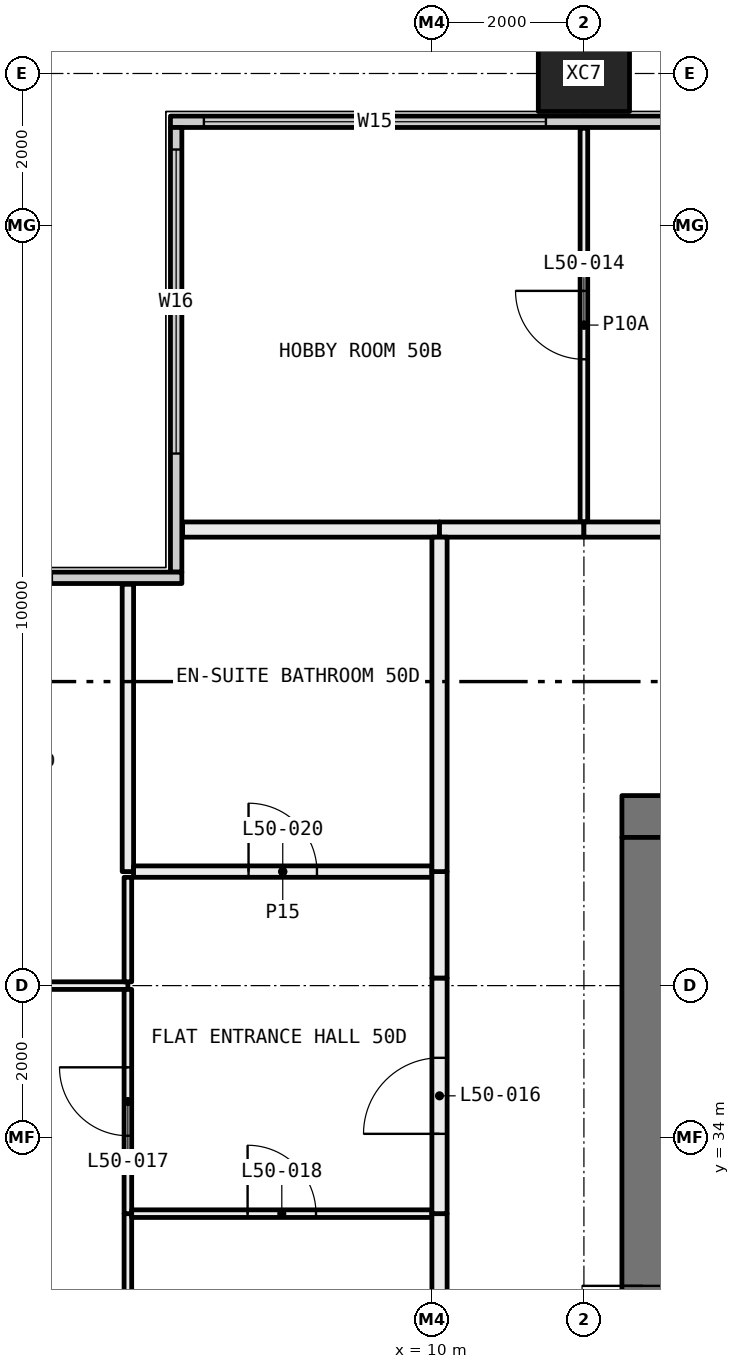
"""IFC4 building model, lengths in metres.
Left out: names, types, materials, properties, quantities, classifications, styles, units other than length and angle.
Written with IfcOpenShell. Run it as: python <this file> out.ifc"""

import sys

from ifc_helpers import new_model, si_unit, direction, frame, frame_2d, origin, origin_2d, place, context, subcontext, project, spatial, rectangle, hollow_rectangle, extrude, element, fill, save


model = new_model("IFC4")
c1 = context("Model", 3, precision=1e-05, world=origin(), true_north=direction((0.0, 1.0)))
c2 = subcontext(c1, "Body", "Model", "MODEL_VIEW")
j1 = project(units=[si_unit("LENGTHUNIT", "METRE"), si_unit("PLANEANGLEUNIT", "RADIAN")], contexts=[c1])
p1 = place(None, origin())
s1 = spatial("IfcSite", under=j1, at=p1, CompositionType="ELEMENT")
p2 = place(p1, origin())
s2 = spatial("IfcBuilding", under=s1, at=p2, CompositionType="ELEMENT")
p3 = place(p2, frame((0.0, 0.0, 189.3)))
s3 = spatial("IfcBuildingStorey", under=s2, at=p3, CompositionType="ELEMENT", Elevation=189.3)
p4 = place(p3, frame((12.0, 48.0, -0.4), z_axis=(0.0, 0.0, 1.0), x_axis=(1.0, 0.0, 0.0)))
e1 = element("IfcColumn", 1, at=p4, inside=s3, PredefinedType="COLUMN", context=c2, shape_type="SweptSolid", body=[
    extrude(hollow_rectangle(XDim=1.2, YDim=1.0, WallThickness=0.045, at=origin_2d()), origin(), (0.0, 0.0, 1.0), 3.45),
])
p5 = place(p3, frame((6.56, 47.365, 0.0), z_axis=(0.0, 0.0, 1.0), x_axis=(1.0, 0.0, 0.0)))
e2 = element("IfcWall", 2, at=p5, inside=s3, PredefinedType="ELEMENTEDWALL", context=c2, shape_type="SweptSolid", body=[
    extrude(rectangle(XDim=46.88, YDim=0.15, at=frame_2d((23.44, 0.0))), origin(), (0.0, 0.0, 1.0), 3.05),
])
p6 = place(p5, frame((0.44, 0.0, 0.45)))
e3 = element("IfcOpeningElement", 3, at=p6, cuts=e2, PredefinedType="OPENING", context=c2, shape_type="SweptSolid", body=[
    extrude(rectangle(XDim=4.5, YDim=2.55, at=frame_2d((2.25, 1.275))), frame((0.0, 0.085, 0.0), z_axis=(0.0, -1.0, 0.0), x_axis=(1.0, 0.0, 0.0)), (0.0, 0.0, 1.0), 0.17),
])
p7 = place(p5, frame((7.69, 0.0, 0.45)))
e4 = element("IfcOpeningElement", 4, at=p7, cuts=e2, PredefinedType="OPENING", context=c2, shape_type="SweptSolid", body=[
    extrude(rectangle(XDim=3.25, YDim=2.55, at=frame_2d((1.625, 1.275))), frame((0.0, 0.085, 0.0), z_axis=(0.0, -1.0, 0.0), x_axis=(1.0, 0.0, 0.0)), (0.0, 0.0, 1.0), 0.17),
])
p8 = place(p5, frame((11.94, 0.0, 0.45)))
e5 = element("IfcOpeningElement", 5, at=p8, cuts=e2, PredefinedType="OPENING", context=c2, shape_type="SweptSolid", body=[
    extrude(rectangle(XDim=3.25, YDim=2.55, at=frame_2d((1.625, 1.275))), frame((0.0, 0.085, 0.0), z_axis=(0.0, -1.0, 0.0), x_axis=(1.0, 0.0, 0.0)), (0.0, 0.0, 1.0), 0.17),
])
p9 = place(p5, frame((19.69, 0.0, 0.45)))
e6 = element("IfcOpeningElement", 6, at=p9, cuts=e2, PredefinedType="OPENING", context=c2, shape_type="SweptSolid", body=[
    extrude(rectangle(XDim=3.25, YDim=2.55, at=frame_2d((1.625, 1.275))), frame((0.0, 0.085, 0.0), z_axis=(0.0, -1.0, 0.0), x_axis=(1.0, 0.0, 0.0)), (0.0, 0.0, 1.0), 0.17),
])
p10 = place(p5, frame((23.94, 0.0, 0.45)))
e7 = element("IfcOpeningElement", 7, at=p10, cuts=e2, PredefinedType="OPENING", context=c2, shape_type="SweptSolid", body=[
    extrude(rectangle(XDim=2.0, YDim=2.55, at=frame_2d((1.0, 1.275))), frame((0.0, 0.085, 0.0), z_axis=(0.0, -1.0, 0.0), x_axis=(1.0, 0.0, 0.0)), (0.0, 0.0, 1.0), 0.17),
])
p11 = place(p5, frame((31.69, 0.0, 0.45)))
e8 = element("IfcOpeningElement", 8, at=p11, cuts=e2, PredefinedType="OPENING", context=c2, shape_type="SweptSolid", body=[
    extrude(rectangle(XDim=3.25, YDim=2.55, at=frame_2d((1.625, 1.275))), frame((0.0, 0.085, 0.0), z_axis=(0.0, -1.0, 0.0), x_axis=(1.0, 0.0, 0.0)), (0.0, 0.0, 1.0), 0.17),
])
p12 = place(p5, frame((35.94, 0.0, 0.45)))
e9 = element("IfcOpeningElement", 9, at=p12, cuts=e2, PredefinedType="OPENING", context=c2, shape_type="SweptSolid", body=[
    extrude(rectangle(XDim=3.25, YDim=2.55, at=frame_2d((1.625, 1.275))), frame((0.0, 0.085, 0.0), z_axis=(0.0, -1.0, 0.0), x_axis=(1.0, 0.0, 0.0)), (0.0, 0.0, 1.0), 0.17),
])
p13 = place(p5, frame((41.94, 0.0, 0.45)))
e10 = element("IfcOpeningElement", 10, at=p13, cuts=e2, PredefinedType="OPENING", context=c2, shape_type="SweptSolid", body=[
    extrude(rectangle(XDim=4.5, YDim=2.55, at=frame_2d((2.25, 1.275))), frame((0.0, 0.085, 0.0), z_axis=(0.0, -1.0, 0.0), x_axis=(1.0, 0.0, 0.0)), (0.0, 0.0, 1.0), 0.17),
])
p14 = place(p3, frame((6.635, 41.44, 0.0), z_axis=(0.0, 0.0, 1.0), x_axis=(0.0, 1.0, 0.0)))
e11 = element("IfcWall", 11, at=p14, inside=s3, PredefinedType="ELEMENTEDWALL", context=c2, shape_type="SweptSolid", body=[
    extrude(rectangle(XDim=5.85, YDim=0.15, at=frame_2d((2.925, 0.0))), origin(), (0.0, 0.0, 1.0), 3.05),
])
p15 = place(p14, frame((1.56, 0.0, 0.45)))
e12 = element("IfcOpeningElement", 12, at=p15, cuts=e11, PredefinedType="OPENING", context=c2, shape_type="SweptSolid", body=[
    extrude(rectangle(XDim=4.0, YDim=2.55, at=frame_2d((2.0, 1.275))), frame((0.0, 0.085, 0.0), z_axis=(0.0, -1.0, 0.0), x_axis=(1.0, 0.0, 0.0)), (0.0, 0.0, 1.0), 0.17),
])
p16 = place(p3, frame((0.56, 41.365, 0.0), z_axis=(0.0, 0.0, 1.0), x_axis=(1.0, 0.0, 0.0)))
e13 = element("IfcWall", 13, at=p16, inside=s3, PredefinedType="ELEMENTEDWALL", context=c2, shape_type="SweptSolid", body=[
    extrude(rectangle(XDim=6.15, YDim=0.15, at=frame_2d((3.075, 0.0))), origin(), (0.0, 0.0, 1.0), 3.05),
])
p17 = place(p16, frame((0.44, 0.0, 0.45)))
e14 = element("IfcOpeningElement", 14, at=p17, cuts=e13, PredefinedType="OPENING", context=c2, shape_type="SweptSolid", body=[
    extrude(rectangle(XDim=4.0, YDim=2.55, at=frame_2d((2.0, 1.275))), frame((0.0, 0.085, 0.0), z_axis=(0.0, -1.0, 0.0), x_axis=(1.0, 0.0, 0.0)), (0.0, 0.0, 1.0), 0.17),
])
p18 = place(p3, frame((12.0, 42.1, 0.0), z_axis=(0.0, 0.0, 1.0), x_axis=(0.0, 1.0, 0.0)))
e15 = element("IfcWall", 15, at=p18, inside=s3, PredefinedType="PARTITIONING", context=c2, shape_type="SweptSolid", body=[
    extrude(rectangle(XDim=5.18, YDim=0.1, at=frame_2d((2.59, 0.0))), origin(), (0.0, 0.0, 1.0), 3.05),
])
p19 = place(p18, frame((2.14, 0.0, 0.0)))
e16 = element("IfcOpeningElement", 16, at=p19, cuts=e15, PredefinedType="OPENING", context=c2, shape_type="SweptSolid", body=[
    extrude(rectangle(XDim=0.9, YDim=2.1, at=frame_2d((0.45, 1.05))), frame((0.0, 0.06, 0.0), z_axis=(0.0, -1.0, 0.0), x_axis=(1.0, 0.0, 0.0)), (0.0, 0.0, 1.0), 0.12),
])
p20 = place(p3, frame((6.72, 42.0, 0.0), z_axis=(0.0, 0.0, 1.0), x_axis=(1.0, 0.0, 0.0)))
e17 = element("IfcWall", 17, at=p20, inside=s3, PredefinedType="PARTITIONING", context=c2, shape_type="SweptSolid", body=[
    extrude(rectangle(XDim=3.38, YDim=0.2, at=frame_2d((1.69, 0.0))), origin(), (0.0, 0.0, 1.0), 3.05),
])
p21 = place(p3, frame((10.1, 42.0, 0.0), z_axis=(0.0, 0.0, 1.0), x_axis=(1.0, 0.0, 0.0)))
e18 = element("IfcWall", 18, at=p21, inside=s3, PredefinedType="PARTITIONING", context=c2, shape_type="SweptSolid", body=[
    extrude(rectangle(XDim=1.9, YDim=0.2, at=frame_2d((0.95, 0.0))), origin(), (0.0, 0.0, 1.0), 3.05),
])
p22 = place(p3, frame((12.0, 42.0, 0.0), z_axis=(0.0, 0.0, 1.0), x_axis=(1.0, 0.0, 0.0)))
e19 = element("IfcWall", 19, at=p22, inside=s3, PredefinedType="PARTITIONING", context=c2, shape_type="SweptSolid", body=[
    extrude(rectangle(XDim=6.0, YDim=0.2, at=frame_2d((3.0, 0.0))), origin(), (0.0, 0.0, 1.0), 3.05),
])
p23 = place(p22, frame((2.5, 0.0, 0.0)))
e20 = element("IfcOpeningElement", 20, at=p23, cuts=e19, PredefinedType="OPENING", context=c2, shape_type="SweptSolid", body=[
    extrude(rectangle(XDim=1.0, YDim=2.1, at=frame_2d((0.5, 1.05))), frame((0.0, 0.11, 0.0), z_axis=(0.0, -1.0, 0.0), x_axis=(1.0, 0.0, 0.0)), (0.0, 0.0, 1.0), 0.22),
])
p24 = place(p3, frame((6.0, 36.0, 0.0), z_axis=(0.0, 0.0, 1.0), x_axis=(-1.0, 0.0, 0.0)))
e21 = element("IfcWall", 21, at=p24, inside=s3, PredefinedType="PARTITIONING", context=c2, shape_type="SweptSolid", body=[
    extrude(rectangle(XDim=5.28, YDim=0.1, at=frame_2d((2.64, 0.0))), origin(), (0.0, 0.0, 1.0), 2.45),
])
p25 = place(p24, frame((2.19, 0.0, 0.0)))
e22 = element("IfcOpeningElement", 22, at=p25, cuts=e21, PredefinedType="OPENING", context=c2, shape_type="SweptSolid", body=[
    extrude(rectangle(XDim=0.9, YDim=2.1, at=frame_2d((0.45, 1.05))), frame((0.0, 0.06, 0.0), z_axis=(0.0, -1.0, 0.0), x_axis=(1.0, 0.0, 0.0)), (0.0, 0.0, 1.0), 0.12),
])
p26 = place(p3, frame((6.0, 24.05, 0.0), z_axis=(0.0, 0.0, 1.0), x_axis=(0.0, 1.0, 0.0)))
e23 = element("IfcWall", 23, at=p26, inside=s3, PredefinedType="PARTITIONING", context=c2, shape_type="SweptSolid", body=[
    extrude(rectangle(XDim=8.95, YDim=0.1, at=frame_2d((4.475, 0.0))), origin(), (0.0, 0.0, 1.0), 2.45),
])
p27 = place(p3, frame((6.0, 33.0, 0.0), z_axis=(0.0, 0.0, 1.0), x_axis=(0.0, 1.0, 0.0)))
e24 = element("IfcWall", 24, at=p27, inside=s3, PredefinedType="PARTITIONING", context=c2, shape_type="SweptSolid", body=[
    extrude(rectangle(XDim=2.95, YDim=0.1, at=frame_2d((1.475, 0.0))), origin(), (0.0, 0.0, 1.0), 2.45),
])
p28 = place(p27, frame((1.025, 0.0, 0.0)))
e25 = element("IfcOpeningElement", 25, at=p28, cuts=e24, PredefinedType="OPENING", context=c2, shape_type="SweptSolid", body=[
    extrude(rectangle(XDim=0.9, YDim=2.1, at=frame_2d((0.45, 1.05))), frame((0.0, 0.06, 0.0), z_axis=(0.0, -1.0, 0.0), x_axis=(1.0, 0.0, 0.0)), (0.0, 0.0, 1.0), 0.12),
])
p29 = place(p3, frame((6.0, 36.05, 0.0), z_axis=(0.0, 0.0, 1.0), x_axis=(0.0, 1.0, 0.0)))
e26 = element("IfcWall", 26, at=p29, inside=s3, PredefinedType="PARTITIONING", context=c2, shape_type="SweptSolid", body=[
    extrude(rectangle(XDim=1.375, YDim=0.1, at=frame_2d((0.688, 0.0))), origin(), (0.0, 0.0, 1.0), 2.45),
])
p30 = place(p3, frame((6.0, 37.5, 0.0), z_axis=(0.0, 0.0, 1.0), x_axis=(0.0, 1.0, 0.0)))
e27 = element("IfcWall", 27, at=p30, inside=s3, PredefinedType="PARTITIONING", context=c2, shape_type="SweptSolid", body=[
    extrude(rectangle(XDim=3.78, YDim=0.15, at=frame_2d((1.89, 0.0))), origin(), (0.0, 0.0, 1.0), 3.05),
])
p31 = place(p3, frame((10.0, 33.0, 0.0), z_axis=(0.0, 0.0, 1.0), x_axis=(-1.0, 0.0, 0.0)))
e28 = element("IfcWall", 28, at=p31, inside=s3, PredefinedType="PARTITIONING", context=c2, shape_type="SweptSolid", body=[
    extrude(rectangle(XDim=3.95, YDim=0.1, at=frame_2d((1.975, 0.0))), origin(), (0.0, 0.0, 1.0), 3.05),
])
p32 = place(p31, frame((1.525, 0.0, 0.0)))
e29 = element("IfcOpeningElement", 29, at=p32, cuts=e28, PredefinedType="OPENING", context=c2, shape_type="SweptSolid", body=[
    extrude(rectangle(XDim=0.9, YDim=2.1, at=frame_2d((0.45, 1.05))), frame((0.0, 0.06, 0.0), z_axis=(0.0, -1.0, 0.0), x_axis=(1.0, 0.0, 0.0)), (0.0, 0.0, 1.0), 0.12),
])
p33 = place(p3, frame((10.1, 24.1, 0.0), z_axis=(0.0, 0.0, 1.0), x_axis=(0.0, 1.0, 0.0)))
e30 = element("IfcWall", 30, at=p33, inside=s3, PredefinedType="PARTITIONING", context=c2, shape_type="SweptSolid", body=[
    extrude(rectangle(XDim=8.9, YDim=0.2, at=frame_2d((4.45, 0.0))), origin(), (0.0, 0.0, 1.0), 3.05),
])
p34 = place(p3, frame((10.0, 37.5, 0.0), z_axis=(0.0, 0.0, 1.0), x_axis=(-1.0, 0.0, 0.0)))
e31 = element("IfcWall", 31, at=p34, inside=s3, PredefinedType="PARTITIONING", context=c2, shape_type="SweptSolid", body=[
    extrude(rectangle(XDim=3.925, YDim=0.15, at=frame_2d((1.962, 0.0))), origin(), (0.0, 0.0, 1.0), 3.05),
])
p35 = place(p34, frame((1.512, 0.0, 0.0)))
e32 = element("IfcOpeningElement", 32, at=p35, cuts=e31, PredefinedType="OPENING", context=c2, shape_type="SweptSolid", body=[
    extrude(rectangle(XDim=0.9, YDim=2.1, at=frame_2d((0.45, 1.05))), frame((0.0, 0.085, 0.0), z_axis=(0.0, -1.0, 0.0), x_axis=(1.0, 0.0, 0.0)), (0.0, 0.0, 1.0), 0.17),
])
p36 = place(p3, frame((10.1, 33.0, 0.0), z_axis=(0.0, 0.0, 1.0), x_axis=(0.0, 1.0, 0.0)))
e33 = element("IfcWall", 33, at=p36, inside=s3, PredefinedType="PARTITIONING", context=c2, shape_type="SweptSolid", body=[
    extrude(rectangle(XDim=3.1, YDim=0.2, at=frame_2d((1.55, 0.0))), origin(), (0.0, 0.0, 1.0), 2.45),
])
p37 = place(p36, frame((1.05, 0.0, 0.0)))
e34 = element("IfcOpeningElement", 34, at=p37, cuts=e33, PredefinedType="OPENING", context=c2, shape_type="SweptSolid", body=[
    extrude(rectangle(XDim=1.0, YDim=2.1, at=frame_2d((0.5, 1.05))), frame((0.0, 0.11, 0.0), z_axis=(0.0, -1.0, 0.0), x_axis=(1.0, 0.0, 0.0)), (0.0, 0.0, 1.0), 0.22),
])
p38 = place(p3, frame((10.1, 36.1, 0.0), z_axis=(0.0, 0.0, 1.0), x_axis=(0.0, 1.0, 0.0)))
e35 = element("IfcWall", 35, at=p38, inside=s3, PredefinedType="PARTITIONING", context=c2, shape_type="SweptSolid", body=[
    extrude(rectangle(XDim=1.4, YDim=0.2, at=frame_2d((0.7, 0.0))), origin(), (0.0, 0.0, 1.0), 3.05),
])
p39 = place(p3, frame((10.1, 37.5, 0.0), z_axis=(0.0, 0.0, 1.0), x_axis=(0.0, 1.0, 0.0)))
e36 = element("IfcWall", 36, at=p39, inside=s3, PredefinedType="PARTITIONING", context=c2, shape_type="SweptSolid", body=[
    extrude(rectangle(XDim=4.4, YDim=0.2, at=frame_2d((2.2, 0.0))), origin(), (0.0, 0.0, 1.0), 3.05),
])
p40 = place(p3, frame((12.5, 38.225, 0.0), z_axis=(0.0, 0.0, 1.0), x_axis=(1.0, 0.0, 0.0)))
e37 = element("IfcWall", 37, at=p40, inside=s3, PredefinedType="SHEAR", context=c2, shape_type="SweptSolid", body=[
    extrude(rectangle(XDim=11.0, YDim=0.55, at=frame_2d((5.5, 0.0))), origin(), (0.0, 0.0, 1.0), 3.05),
])
p41 = place(p40, frame((8.525, 0.0, 0.0)))
e38 = element("IfcOpeningElement", 38, at=p41, cuts=e37, PredefinedType="OPENING", context=c2, shape_type="SweptSolid", body=[
    extrude(rectangle(XDim=1.6, YDim=2.1, at=frame_2d((0.8, 1.05))), frame((0.0, 0.285, 0.0), z_axis=(0.0, -1.0, 0.0), x_axis=(1.0, 0.0, 0.0)), (0.0, 0.0, 1.0), 0.57),
])
p42 = place(p3, frame((12.775, 22.05, 0.0), z_axis=(0.0, 0.0, 1.0), x_axis=(0.0, 1.0, 0.0)))
e39 = element("IfcWall", 39, at=p42, inside=s3, PredefinedType="SHEAR", context=c2, shape_type="SweptSolid", body=[
    extrude(rectangle(XDim=15.9, YDim=0.55, at=frame_2d((7.95, 0.0))), origin(), (0.0, 0.0, 1.0), 3.05),
])
p43 = place(p42, frame((8.4, 0.0, 0.0)))
e40 = element("IfcOpeningElement", 40, at=p43, cuts=e39, PredefinedType="OPENING", context=c2, shape_type="SweptSolid", body=[
    extrude(rectangle(XDim=1.6, YDim=2.1, at=frame_2d((0.8, 1.05))), frame((0.0, 0.285, 0.0), z_axis=(0.0, -1.0, 0.0), x_axis=(1.0, 0.0, 0.0)), (0.0, 0.0, 1.0), 0.57),
])
p44 = place(p42, frame((2.175, 0.0, 0.0)))
e41 = element("IfcOpeningElement", 41, at=p44, cuts=e39, PredefinedType="OPENING", context=c2, shape_type="SweptSolid", body=[
    extrude(rectangle(XDim=1.0, YDim=2.1, at=frame_2d((0.5, 1.05))), frame((0.0, 0.285, 0.0), z_axis=(0.0, -1.0, 0.0), x_axis=(1.0, 0.0, 0.0)), (0.0, 0.0, 1.0), 0.57),
])
p45 = place(p6, origin())
e42 = element("IfcWindow", 42, at=p45, inside=s3, PartitioningType="SINGLE_PANEL", PredefinedType="WINDOW", context=c2, shape_type="SweptSolid", body=[
    extrude(rectangle(XDim=4.5, YDim=2.55, at=frame_2d((2.25, 1.275))), frame((0.0, 0.03, 0.0), z_axis=(0.0, -1.0, 0.0), x_axis=(1.0, 0.0, 0.0)), (0.0, 0.0, 1.0), 0.06),
])
fill(e3, e42)
p46 = place(p15, origin())
e43 = element("IfcWindow", 43, at=p46, inside=s3, PartitioningType="SINGLE_PANEL", PredefinedType="WINDOW", context=c2, shape_type="SweptSolid", body=[
    extrude(rectangle(XDim=4.0, YDim=2.55, at=frame_2d((2.0, 1.275))), frame((0.0, 0.03, 0.0), z_axis=(0.0, -1.0, 0.0), x_axis=(1.0, 0.0, 0.0)), (0.0, 0.0, 1.0), 0.06),
])
fill(e12, e43)
p47 = place(p19, origin())
e44 = element("IfcDoor", 44, at=p47, inside=s3, OperationType="SINGLE_SWING_LEFT", PredefinedType="DOOR", context=c2, shape_type="SweptSolid", body=[
    extrude(rectangle(XDim=0.9, YDim=2.1, at=frame_2d((0.45, 1.05))), frame((0.0, 0.025, 0.0), z_axis=(0.0, -1.0, 0.0), x_axis=(1.0, 0.0, 0.0)), (0.0, 0.0, 1.0), 0.05),
])
fill(e16, e44)
p48 = place(p37, origin())
e45 = element("IfcDoor", 45, at=p48, inside=s3, OperationType="SINGLE_SWING_RIGHT", PredefinedType="DOOR", context=c2, shape_type="SweptSolid", body=[
    extrude(rectangle(XDim=1.0, YDim=2.1, at=frame_2d((0.5, 1.05))), frame((0.0, 0.025, 0.0), z_axis=(0.0, -1.0, 0.0), x_axis=(1.0, 0.0, 0.0)), (0.0, 0.0, 1.0), 0.05),
])
fill(e34, e45)
p49 = place(p28, origin())
e46 = element("IfcDoor", 46, at=p49, inside=s3, OperationType="SINGLE_SWING_LEFT", PredefinedType="DOOR", context=c2, shape_type="SweptSolid", body=[
    extrude(rectangle(XDim=0.9, YDim=2.1, at=frame_2d((0.45, 1.05))), frame((0.0, 0.025, 0.0), z_axis=(0.0, -1.0, 0.0), x_axis=(1.0, 0.0, 0.0)), (0.0, 0.0, 1.0), 0.05),
])
fill(e25, e46)
p50 = place(p32, frame((0.9, 0.0, 0.0), x_axis=(-1.0, 0.0, 0.0)))
e47 = element("IfcDoor", 47, at=p50, inside=s3, OperationType="SINGLE_SWING_RIGHT", PredefinedType="DOOR", context=c2, shape_type="SweptSolid", body=[
    extrude(rectangle(XDim=0.9, YDim=2.1, at=frame_2d((0.45, 1.05))), frame((0.0, 0.025, 0.0), z_axis=(0.0, -1.0, 0.0), x_axis=(1.0, 0.0, 0.0)), (0.0, 0.0, 1.0), 0.05),
])
fill(e29, e47)
p51 = place(p35, frame((0.9, 0.0, 0.0), x_axis=(-1.0, 0.0, 0.0)))
e48 = element("IfcDoor", 48, at=p51, inside=s3, OperationType="SINGLE_SWING_RIGHT", PredefinedType="DOOR", context=c2, shape_type="SweptSolid", body=[
    extrude(rectangle(XDim=0.9, YDim=2.1, at=frame_2d((0.45, 1.05))), frame((0.0, 0.025, 0.0), z_axis=(0.0, -1.0, 0.0), x_axis=(1.0, 0.0, 0.0)), (0.0, 0.0, 1.0), 0.05),
])
fill(e32, e48)
p52 = place(p43, origin())
e49 = element("IfcDoor", 49, at=p52, inside=s3, OperationType="DOUBLE_DOOR_SINGLE_SWING", PredefinedType="DOOR", context=c2, shape_type="SweptSolid", body=[
    extrude(rectangle(XDim=1.6, YDim=2.1, at=frame_2d((0.8, 1.05))), frame((0.0, 0.025, 0.0), z_axis=(0.0, -1.0, 0.0), x_axis=(1.0, 0.0, 0.0)), (0.0, 0.0, 1.0), 0.05),
])
fill(e40, e49)
save(model, sys.argv[1])
